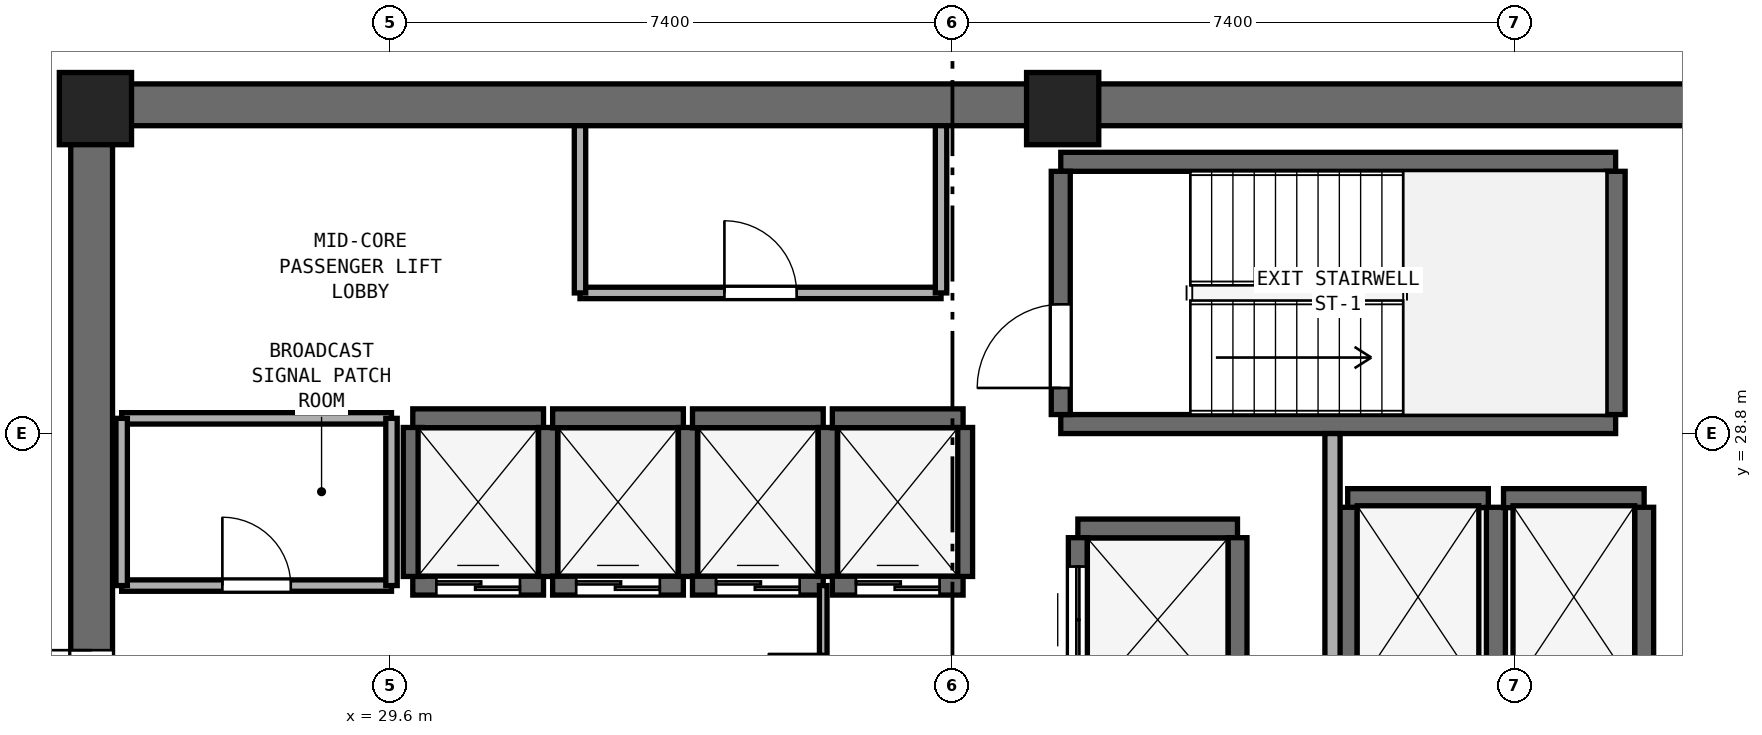
"""IFC4 building model, lengths in metres.
Left out: names, types, materials, properties, quantities, classifications, styles, units other than length and angle.
Written with IfcOpenShell. Run it as: python <this file> out.ifc"""

import sys

from ifc_helpers import new_model, si_unit, direction, frame, frame_2d, origin, origin_2d, place, context, subcontext, project, spatial, rectangle, extrude, element, fill, save


model = new_model("IFC4")
c1 = context("Model", 3, precision=1e-05, world=origin(), true_north=direction((0.0, 1.0)))
c2 = subcontext(c1, "Body", "Model", "MODEL_VIEW")
j1 = project(units=[si_unit("LENGTHUNIT", "METRE"), si_unit("PLANEANGLEUNIT", "RADIAN")], contexts=[c1])
p1 = place(None, origin())
s1 = spatial("IfcSite", under=j1, at=p1, CompositionType="ELEMENT")
p2 = place(p1, origin())
s2 = spatial("IfcBuilding", under=s1, at=p2, CompositionType="ELEMENT")
p3 = place(p2, frame((0.0, 0.0, 125.0)))
s3 = spatial("IfcBuildingStorey", under=s2, at=p3, CompositionType="ELEMENT", Elevation=125.0)
p4 = place(p3, frame((25.4, 33.125, 0.0), z_axis=(0.0, 0.0, 1.0), x_axis=(1.0, 0.0, 0.0)))
e1 = element("IfcWall", 1, at=p4, inside=s3, PredefinedType="SHEAR", context=c2, shape_type="SweptSolid", body=[
    extrude(rectangle(XDim=23.2, YDim=0.55, at=frame_2d((11.6, 0.0))), origin(), (0.0, 0.0, 1.0), 3.54),
])
p5 = place(p3, frame((25.675, 17.55, 0.0), z_axis=(0.0, 0.0, 1.0), x_axis=(0.0, 1.0, 0.0)))
e2 = element("IfcWall", 2, at=p5, inside=s3, PredefinedType="SHEAR", context=c2, shape_type="SweptSolid", body=[
    extrude(rectangle(XDim=15.3, YDim=0.55, at=frame_2d((7.65, 0.0))), origin(), (0.0, 0.0, 1.0), 3.54),
])
p6 = place(p5, frame((6.9, 0.0, 0.0)))
e3 = element("IfcOpeningElement", 3, at=p6, cuts=e2, PredefinedType="OPENING", context=c2, shape_type="SweptSolid", body=[
    extrude(rectangle(XDim=1.5, YDim=2.15, at=frame_2d((0.75, 1.075))), frame((0.0, 0.285, 0.0), z_axis=(0.0, -1.0, 0.0), x_axis=(1.0, 0.0, 0.0)), (0.0, 0.0, 1.0), 0.57),
])
for number, where, z_axis, x_axis in (
    (4, (38.45, 33.075, 0.0), (0.0, 0.0, 1.0), (1.0, 0.0, 0.0)),
    (5, (25.725, 33.075, 0.0), (0.0, 0.0, 1.0), (1.0, 0.0, 0.0)),
):
    element("IfcColumn", number, at=place(p3, frame(where, z_axis=z_axis, x_axis=x_axis)), inside=s3, PredefinedType="PILASTER", context=c2, shape_type="SweptSolid", body=[
        extrude(rectangle(XDim=0.95, YDim=0.95, at=origin_2d()), origin(), (0.0, 0.0, 1.0), 3.8),
    ])
for number, where, z_axis, x_axis in (
    (6, (38.425, 28.925, 0.0), (0.0, 0.0, 1.0), (1.0, 0.0, 0.0)),
    (7, (38.425, 32.375, 0.0), (0.0, 0.0, 1.0), (1.0, 0.0, 0.0)),
):
    element("IfcWall", number, at=place(p3, frame(where, z_axis=z_axis, x_axis=x_axis)), inside=s3, PredefinedType="SHEAR", context=c2, shape_type="SweptSolid", body=[
        extrude(rectangle(XDim=7.3, YDim=0.25, at=frame_2d((3.65, 0.0))), origin(), (0.0, 0.0, 1.0), 3.54),
    ])
p7 = place(p3, frame((38.425, 29.05, 0.0), z_axis=(0.0, 0.0, 1.0), x_axis=(0.0, 1.0, 0.0)))
e8 = element("IfcWall", 8, at=p7, inside=s3, PredefinedType="SHEAR", context=c2, shape_type="SweptSolid", body=[
    extrude(rectangle(XDim=3.2, YDim=0.25, at=frame_2d((1.6, 0.0))), origin(), (0.0, 0.0, 1.0), 3.54),
])
p8 = place(p7, frame((0.35, 0.0, 0.0)))
e9 = element("IfcOpeningElement", 9, at=p8, cuts=e8, PredefinedType="OPENING", context=c2, shape_type="SweptSolid", body=[
    extrude(rectangle(XDim=1.1, YDim=2.15, at=frame_2d((0.55, 1.075))), frame((0.0, 0.135, 0.0), z_axis=(0.0, -1.0, 0.0), x_axis=(1.0, 0.0, 0.0)), (0.0, 0.0, 1.0), 0.27),
])
p9 = place(p3, frame((45.725, 29.05, 0.0), z_axis=(0.0, 0.0, 1.0), x_axis=(0.0, 1.0, 0.0)))
e10 = element("IfcWall", 10, at=p9, inside=s3, PredefinedType="SHEAR", context=c2, shape_type="SweptSolid", body=[
    extrude(rectangle(XDim=3.2, YDim=0.25, at=frame_2d((1.6, 0.0))), origin(), (0.0, 0.0, 1.0), 3.54),
])
p10 = place(p3, frame((29.9, 26.8, 0.0), z_axis=(0.0, 0.0, 1.0), x_axis=(1.0, 0.0, 0.0)))
e11 = element("IfcWall", 11, at=p10, inside=s3, PredefinedType="SHEAR", context=c2, shape_type="SweptSolid", body=[
    extrude(rectangle(XDim=1.72, YDim=0.25, at=frame_2d((0.86, 0.0))), origin(), (0.0, 0.0, 1.0), 3.54),
])
p11 = place(p10, frame((0.31, 0.0, 0.0)))
e12 = element("IfcOpeningElement", 12, at=p11, cuts=e11, PredefinedType="OPENING", context=c2, shape_type="SweptSolid", body=[
    extrude(rectangle(XDim=1.1, YDim=2.15, at=frame_2d((0.55, 1.075))), frame((0.0, 0.135, 0.0), z_axis=(0.0, -1.0, 0.0), x_axis=(1.0, 0.0, 0.0)), (0.0, 0.0, 1.0), 0.27),
])
p12 = place(p3, frame((29.9, 29.0, 0.0), z_axis=(0.0, 0.0, 1.0), x_axis=(1.0, 0.0, 0.0)))
e13 = element("IfcWall", 13, at=p12, inside=s3, PredefinedType="SHEAR", context=c2, shape_type="SweptSolid", body=[
    extrude(rectangle(XDim=1.72, YDim=0.25, at=frame_2d((0.86, 0.0))), origin(), (0.0, 0.0, 1.0), 3.54),
])
for number, where, z_axis, x_axis in (
    (14, (29.9, 26.92, 0.0), (0.0, 0.0, 1.0), (0.0, 1.0, 0.0)),
    (15, (31.68, 26.92, 0.0), (0.0, 0.0, 1.0), (0.0, 1.0, 0.0)),
):
    element("IfcWall", number, at=place(p3, frame(where, z_axis=z_axis, x_axis=x_axis)), inside=s3, PredefinedType="SHEAR", context=c2, shape_type="SweptSolid", body=[
        extrude(rectangle(XDim=1.96, YDim=0.25, at=frame_2d((0.98, 0.0))), origin(), (0.0, 0.0, 1.0), 3.54),
    ])
p13 = place(p3, frame((31.74, 26.8, 0.0), z_axis=(0.0, 0.0, 1.0), x_axis=(1.0, 0.0, 0.0)))
e16 = element("IfcWall", 16, at=p13, inside=s3, PredefinedType="SHEAR", context=c2, shape_type="SweptSolid", body=[
    extrude(rectangle(XDim=1.72, YDim=0.25, at=frame_2d((0.86, 0.0))), origin(), (0.0, 0.0, 1.0), 3.54),
])
p14 = place(p13, frame((0.31, 0.0, 0.0)))
e17 = element("IfcOpeningElement", 17, at=p14, cuts=e16, PredefinedType="OPENING", context=c2, shape_type="SweptSolid", body=[
    extrude(rectangle(XDim=1.1, YDim=2.15, at=frame_2d((0.55, 1.075))), frame((0.0, 0.135, 0.0), z_axis=(0.0, -1.0, 0.0), x_axis=(1.0, 0.0, 0.0)), (0.0, 0.0, 1.0), 0.27),
])
p15 = place(p3, frame((31.74, 29.0, 0.0), z_axis=(0.0, 0.0, 1.0), x_axis=(1.0, 0.0, 0.0)))
e18 = element("IfcWall", 18, at=p15, inside=s3, PredefinedType="SHEAR", context=c2, shape_type="SweptSolid", body=[
    extrude(rectangle(XDim=1.72, YDim=0.25, at=frame_2d((0.86, 0.0))), origin(), (0.0, 0.0, 1.0), 3.54),
])
p16 = place(p3, frame((33.52, 26.92, 0.0), z_axis=(0.0, 0.0, 1.0), x_axis=(0.0, 1.0, 0.0)))
e19 = element("IfcWall", 19, at=p16, inside=s3, PredefinedType="SHEAR", context=c2, shape_type="SweptSolid", body=[
    extrude(rectangle(XDim=1.96, YDim=0.25, at=frame_2d((0.98, 0.0))), origin(), (0.0, 0.0, 1.0), 3.54),
])
p17 = place(p3, frame((33.58, 26.8, 0.0), z_axis=(0.0, 0.0, 1.0), x_axis=(1.0, 0.0, 0.0)))
e20 = element("IfcWall", 20, at=p17, inside=s3, PredefinedType="SHEAR", context=c2, shape_type="SweptSolid", body=[
    extrude(rectangle(XDim=1.72, YDim=0.25, at=frame_2d((0.86, 0.0))), origin(), (0.0, 0.0, 1.0), 3.54),
])
p18 = place(p17, frame((0.31, 0.0, 0.0)))
e21 = element("IfcOpeningElement", 21, at=p18, cuts=e20, PredefinedType="OPENING", context=c2, shape_type="SweptSolid", body=[
    extrude(rectangle(XDim=1.1, YDim=2.15, at=frame_2d((0.55, 1.075))), frame((0.0, 0.135, 0.0), z_axis=(0.0, -1.0, 0.0), x_axis=(1.0, 0.0, 0.0)), (0.0, 0.0, 1.0), 0.27),
])
p19 = place(p3, frame((33.58, 29.0, 0.0), z_axis=(0.0, 0.0, 1.0), x_axis=(1.0, 0.0, 0.0)))
e22 = element("IfcWall", 22, at=p19, inside=s3, PredefinedType="SHEAR", context=c2, shape_type="SweptSolid", body=[
    extrude(rectangle(XDim=1.72, YDim=0.25, at=frame_2d((0.86, 0.0))), origin(), (0.0, 0.0, 1.0), 3.54),
])
p20 = place(p3, frame((35.36, 26.92, 0.0), z_axis=(0.0, 0.0, 1.0), x_axis=(0.0, 1.0, 0.0)))
e23 = element("IfcWall", 23, at=p20, inside=s3, PredefinedType="SHEAR", context=c2, shape_type="SweptSolid", body=[
    extrude(rectangle(XDim=1.96, YDim=0.25, at=frame_2d((0.98, 0.0))), origin(), (0.0, 0.0, 1.0), 3.54),
])
p21 = place(p3, frame((35.42, 26.8, 0.0), z_axis=(0.0, 0.0, 1.0), x_axis=(1.0, 0.0, 0.0)))
e24 = element("IfcWall", 24, at=p21, inside=s3, PredefinedType="SHEAR", context=c2, shape_type="SweptSolid", body=[
    extrude(rectangle(XDim=1.72, YDim=0.25, at=frame_2d((0.86, 0.0))), origin(), (0.0, 0.0, 1.0), 3.54),
])
p22 = place(p21, frame((0.31, 0.0, 0.0)))
e25 = element("IfcOpeningElement", 25, at=p22, cuts=e24, PredefinedType="OPENING", context=c2, shape_type="SweptSolid", body=[
    extrude(rectangle(XDim=1.1, YDim=2.15, at=frame_2d((0.55, 1.075))), frame((0.0, 0.135, 0.0), z_axis=(0.0, -1.0, 0.0), x_axis=(1.0, 0.0, 0.0)), (0.0, 0.0, 1.0), 0.27),
])
p23 = place(p3, frame((35.42, 29.0, 0.0), z_axis=(0.0, 0.0, 1.0), x_axis=(1.0, 0.0, 0.0)))
e26 = element("IfcWall", 26, at=p23, inside=s3, PredefinedType="SHEAR", context=c2, shape_type="SweptSolid", body=[
    extrude(rectangle(XDim=1.72, YDim=0.25, at=frame_2d((0.86, 0.0))), origin(), (0.0, 0.0, 1.0), 3.54),
])
p24 = place(p3, frame((37.14, 26.92, 0.0), z_axis=(0.0, 0.0, 1.0), x_axis=(0.0, 1.0, 0.0)))
e27 = element("IfcWall", 27, at=p24, inside=s3, PredefinedType="SHEAR", context=c2, shape_type="SweptSolid", body=[
    extrude(rectangle(XDim=1.96, YDim=0.25, at=frame_2d((0.98, 0.0))), origin(), (0.0, 0.0, 1.0), 3.54),
])
p25 = place(p3, frame((42.2, 27.95, 0.0), z_axis=(0.0, 0.0, 1.0), x_axis=(1.0, 0.0, 0.0)))
e28 = element("IfcWall", 28, at=p25, inside=s3, PredefinedType="SHEAR", context=c2, shape_type="SweptSolid", body=[
    extrude(rectangle(XDim=1.85, YDim=0.25, at=frame_2d((0.925, 0.0))), origin(), (0.0, 0.0, 1.0), 3.54),
])
for number, where, z_axis, x_axis in (
    (29, (42.2, 25.47, 0.0), (0.0, 0.0, 1.0), (0.0, 1.0, 0.0)),
    (30, (44.15, 25.47, 0.0), (0.0, 0.0, 1.0), (0.0, 1.0, 0.0)),
):
    element("IfcWall", number, at=place(p3, frame(where, z_axis=z_axis, x_axis=x_axis)), inside=s3, PredefinedType="SHEAR", context=c2, shape_type="SweptSolid", body=[
        extrude(rectangle(XDim=2.36, YDim=0.25, at=frame_2d((1.18, 0.0))), origin(), (0.0, 0.0, 1.0), 3.54),
    ])
p26 = place(p3, frame((44.25, 27.95, 0.0), z_axis=(0.0, 0.0, 1.0), x_axis=(1.0, 0.0, 0.0)))
e31 = element("IfcWall", 31, at=p26, inside=s3, PredefinedType="SHEAR", context=c2, shape_type="SweptSolid", body=[
    extrude(rectangle(XDim=1.85, YDim=0.25, at=frame_2d((0.925, 0.0))), origin(), (0.0, 0.0, 1.0), 3.54),
])
p27 = place(p3, frame((46.1, 25.47, 0.0), z_axis=(0.0, 0.0, 1.0), x_axis=(0.0, 1.0, 0.0)))
e32 = element("IfcWall", 32, at=p27, inside=s3, PredefinedType="SHEAR", context=c2, shape_type="SweptSolid", body=[
    extrude(rectangle(XDim=2.36, YDim=0.25, at=frame_2d((1.18, 0.0))), origin(), (0.0, 0.0, 1.0), 3.54),
])
p28 = place(p3, frame((38.65, 27.55, 0.0), z_axis=(0.0, 0.0, 1.0), x_axis=(1.0, 0.0, 0.0)))
e33 = element("IfcWall", 33, at=p28, inside=s3, PredefinedType="SHEAR", context=c2, shape_type="SweptSolid", body=[
    extrude(rectangle(XDim=2.1, YDim=0.25, at=frame_2d((1.05, 0.0))), origin(), (0.0, 0.0, 1.0), 3.54),
])
p29 = place(p3, frame((38.65, 25.27, 0.0), z_axis=(0.0, 0.0, 1.0), x_axis=(0.0, 1.0, 0.0)))
e34 = element("IfcWall", 34, at=p29, inside=s3, PredefinedType="SHEAR", context=c2, shape_type="SweptSolid", body=[
    extrude(rectangle(XDim=2.16, YDim=0.25, at=frame_2d((1.08, 0.0))), origin(), (0.0, 0.0, 1.0), 3.54),
])
p30 = place(p29, frame((0.38, 0.0, 0.0)))
e35 = element("IfcOpeningElement", 35, at=p30, cuts=e34, PredefinedType="OPENING", context=c2, shape_type="SweptSolid", body=[
    extrude(rectangle(XDim=1.4, YDim=2.2, at=frame_2d((0.7, 1.1))), frame((0.0, 0.135, 0.0), z_axis=(0.0, -1.0, 0.0), x_axis=(1.0, 0.0, 0.0)), (0.0, 0.0, 1.0), 0.27),
])
p31 = place(p3, frame((40.75, 25.27, 0.0), z_axis=(0.0, 0.0, 1.0), x_axis=(0.0, 1.0, 0.0)))
e36 = element("IfcWall", 36, at=p31, inside=s3, PredefinedType="SHEAR", context=c2, shape_type="SweptSolid", body=[
    extrude(rectangle(XDim=2.16, YDim=0.25, at=frame_2d((1.08, 0.0))), origin(), (0.0, 0.0, 1.0), 3.54),
])
p32 = place(p3, frame((42.0, 22.75, 0.0), z_axis=(0.0, 0.0, 1.0), x_axis=(0.0, 1.0, 0.0)))
e37 = element("IfcWall", 37, at=p32, inside=s3, PredefinedType="SOLIDWALL", context=c2, shape_type="SweptSolid", body=[
    extrude(rectangle(XDim=6.05, YDim=0.2, at=frame_2d((3.025, 0.0))), origin(), (0.0, 0.0, 1.0), 3.54),
])
p33 = place(p32, frame((0.65, 0.0, 0.0)))
e38 = element("IfcOpeningElement", 38, at=p33, cuts=e37, PredefinedType="OPENING", context=c2, shape_type="SweptSolid", body=[
    extrude(rectangle(XDim=1.2, YDim=2.15, at=frame_2d((0.6, 1.075))), frame((0.0, 0.11, 0.0), z_axis=(0.0, -1.0, 0.0), x_axis=(1.0, 0.0, 0.0)), (0.0, 0.0, 1.0), 0.22),
])
p34 = place(p3, frame((32.1, 30.65, 0.0), z_axis=(0.0, 0.0, 1.0), x_axis=(1.0, 0.0, 0.0)))
e39 = element("IfcWall", 39, at=p34, inside=s3, PredefinedType="PARTITIONING", context=c2, shape_type="SweptSolid", body=[
    extrude(rectangle(XDim=4.75, YDim=0.15, at=frame_2d((2.375, 0.0))), origin(), (0.0, 0.0, 1.0), 3.54),
])
p35 = place(p34, frame((1.9, 0.0, 0.0)))
e40 = element("IfcOpeningElement", 40, at=p35, cuts=e39, PredefinedType="OPENING", context=c2, shape_type="SweptSolid", body=[
    extrude(rectangle(XDim=0.95, YDim=2.1, at=frame_2d((0.475, 1.05))), frame((0.0, 0.085, 0.0), z_axis=(0.0, -1.0, 0.0), x_axis=(1.0, 0.0, 0.0)), (0.0, 0.0, 1.0), 0.17),
])
for number, where, z_axis, x_axis in (
    (41, (32.1, 30.65, 0.0), (0.0, 0.0, 1.0), (0.0, 1.0, 0.0)),
    (42, (36.85, 30.65, 0.0), (0.0, 0.0, 1.0), (0.0, 1.0, 0.0)),
):
    element("IfcWall", number, at=place(p3, frame(where, z_axis=z_axis, x_axis=x_axis)), inside=s3, PredefinedType="PARTITIONING", context=c2, shape_type="SweptSolid", body=[
        extrude(rectangle(XDim=2.2, YDim=0.15, at=frame_2d((1.1, 0.0))), origin(), (0.0, 0.0, 1.0), 3.54),
    ])
p36 = place(p3, frame((26.07, 26.8, 0.0), z_axis=(0.0, 0.0, 1.0), x_axis=(1.0, 0.0, 0.0)))
e43 = element("IfcWall", 43, at=p36, inside=s3, PredefinedType="PARTITIONING", context=c2, shape_type="SweptSolid", body=[
    extrude(rectangle(XDim=3.55, YDim=0.15, at=frame_2d((1.775, 0.0))), origin(), (0.0, 0.0, 1.0), 3.54),
])
p37 = place(p36, frame((1.325, 0.0, 0.0)))
e44 = element("IfcOpeningElement", 44, at=p37, cuts=e43, PredefinedType="OPENING", context=c2, shape_type="SweptSolid", body=[
    extrude(rectangle(XDim=0.9, YDim=2.1, at=frame_2d((0.45, 1.05))), frame((0.0, 0.085, 0.0), z_axis=(0.0, -1.0, 0.0), x_axis=(1.0, 0.0, 0.0)), (0.0, 0.0, 1.0), 0.17),
])
p38 = place(p3, frame((26.07, 29.0, 0.0), z_axis=(0.0, 0.0, 1.0), x_axis=(1.0, 0.0, 0.0)))
e45 = element("IfcWall", 45, at=p38, inside=s3, PredefinedType="PARTITIONING", context=c2, shape_type="SweptSolid", body=[
    extrude(rectangle(XDim=3.55, YDim=0.15, at=frame_2d((1.775, 0.0))), origin(), (0.0, 0.0, 1.0), 3.54),
])
p39 = place(p3, frame((26.07, 26.8, 0.0), z_axis=(0.0, 0.0, 1.0), x_axis=(0.0, 1.0, 0.0)))
e46 = element("IfcWall", 46, at=p39, inside=s3, PredefinedType="PARTITIONING", context=c2, shape_type="SweptSolid", body=[
    extrude(rectangle(XDim=2.2, YDim=0.15, at=frame_2d((1.1, 0.0))), origin(), (0.0, 0.0, 1.0), 2.64),
])
p40 = place(p3, frame((29.62, 26.8, 0.0), z_axis=(0.0, 0.0, 1.0), x_axis=(0.0, 1.0, 0.0)))
e47 = element("IfcWall", 47, at=p40, inside=s3, PredefinedType="PARTITIONING", context=c2, shape_type="SweptSolid", body=[
    extrude(rectangle(XDim=2.2, YDim=0.15, at=frame_2d((1.1, 0.0))), origin(), (0.0, 0.0, 1.0), 3.54),
])
p41 = place(p3, frame((35.3, 23.6, 0.0), z_axis=(0.0, 0.0, 1.0), x_axis=(0.0, 1.0, 0.0)))
e48 = element("IfcWall", 48, at=p41, inside=s3, PredefinedType="PARTITIONING", context=c2, shape_type="SweptSolid", body=[
    extrude(rectangle(XDim=3.2, YDim=0.1, at=frame_2d((1.6, 0.0))), origin(), (0.0, 0.0, 1.0), 3.54),
])
p42 = place(p41, frame((0.85, 0.0, 0.0)))
e49 = element("IfcOpeningElement", 49, at=p42, cuts=e48, PredefinedType="OPENING", context=c2, shape_type="SweptSolid", body=[
    extrude(rectangle(XDim=1.45, YDim=2.12, at=frame_2d((0.725, 1.06))), frame((0.0, 0.06, 0.0), z_axis=(0.0, -1.0, 0.0), x_axis=(1.0, 0.0, 0.0)), (0.0, 0.0, 1.0), 0.12),
])
p43 = place(p8, origin())
e50 = element("IfcDoor", 50, at=p43, inside=s3, OperationType="SINGLE_SWING_LEFT", PredefinedType="DOOR", context=c2, shape_type="SweptSolid", body=[
    extrude(rectangle(XDim=1.1, YDim=2.15, at=frame_2d((0.55, 1.075))), frame((0.0, 0.025, 0.0), z_axis=(0.0, -1.0, 0.0), x_axis=(1.0, 0.0, 0.0)), (0.0, 0.0, 1.0), 0.05),
])
fill(e9, e50)
p44 = place(p11, origin())
e51 = element("IfcDoor", 51, at=p44, inside=s3, OperationType="DOUBLE_DOOR_SLIDING", PredefinedType="DOOR", context=c2, shape_type="SweptSolid", body=[
    extrude(rectangle(XDim=1.1, YDim=2.15, at=frame_2d((0.55, 1.075))), frame((0.0, 0.025, 0.0), z_axis=(0.0, -1.0, 0.0), x_axis=(1.0, 0.0, 0.0)), (0.0, 0.0, 1.0), 0.05),
])
fill(e12, e51)
p45 = place(p14, origin())
e52 = element("IfcDoor", 52, at=p45, inside=s3, OperationType="DOUBLE_DOOR_SLIDING", PredefinedType="DOOR", context=c2, shape_type="SweptSolid", body=[
    extrude(rectangle(XDim=1.1, YDim=2.15, at=frame_2d((0.55, 1.075))), frame((0.0, 0.025, 0.0), z_axis=(0.0, -1.0, 0.0), x_axis=(1.0, 0.0, 0.0)), (0.0, 0.0, 1.0), 0.05),
])
fill(e17, e52)
p46 = place(p18, origin())
e53 = element("IfcDoor", 53, at=p46, inside=s3, OperationType="DOUBLE_DOOR_SLIDING", PredefinedType="DOOR", context=c2, shape_type="SweptSolid", body=[
    extrude(rectangle(XDim=1.1, YDim=2.15, at=frame_2d((0.55, 1.075))), frame((0.0, 0.025, 0.0), z_axis=(0.0, -1.0, 0.0), x_axis=(1.0, 0.0, 0.0)), (0.0, 0.0, 1.0), 0.05),
])
fill(e21, e53)
p47 = place(p22, origin())
e54 = element("IfcDoor", 54, at=p47, inside=s3, OperationType="DOUBLE_DOOR_SLIDING", PredefinedType="DOOR", context=c2, shape_type="SweptSolid", body=[
    extrude(rectangle(XDim=1.1, YDim=2.15, at=frame_2d((0.55, 1.075))), frame((0.0, 0.025, 0.0), z_axis=(0.0, -1.0, 0.0), x_axis=(1.0, 0.0, 0.0)), (0.0, 0.0, 1.0), 0.05),
])
fill(e25, e54)
p48 = place(p30, origin())
e55 = element("IfcDoor", 55, at=p48, inside=s3, OperationType="DOUBLE_DOOR_SLIDING", PredefinedType="DOOR", context=c2, shape_type="SweptSolid", body=[
    extrude(rectangle(XDim=1.4, YDim=2.2, at=frame_2d((0.7, 1.1))), frame((0.0, 0.025, 0.0), z_axis=(0.0, -1.0, 0.0), x_axis=(1.0, 0.0, 0.0)), (0.0, 0.0, 1.0), 0.05),
])
fill(e35, e55)
p49 = place(p6, origin())
e56 = element("IfcDoor", 56, at=p49, inside=s3, OperationType="DOUBLE_DOOR_SINGLE_SWING", PredefinedType="DOOR", context=c2, shape_type="SweptSolid", body=[
    extrude(rectangle(XDim=1.5, YDim=2.15, at=frame_2d((0.75, 1.075))), frame((0.0, 0.025, 0.0), z_axis=(0.0, -1.0, 0.0), x_axis=(1.0, 0.0, 0.0)), (0.0, 0.0, 1.0), 0.05),
])
fill(e3, e56)
p50 = place(p35, origin())
e57 = element("IfcDoor", 57, at=p50, inside=s3, OperationType="SINGLE_SWING_LEFT", PredefinedType="DOOR", context=c2, shape_type="SweptSolid", body=[
    extrude(rectangle(XDim=0.95, YDim=2.1, at=frame_2d((0.475, 1.05))), frame((0.0, 0.025, 0.0), z_axis=(0.0, -1.0, 0.0), x_axis=(1.0, 0.0, 0.0)), (0.0, 0.0, 1.0), 0.05),
])
fill(e40, e57)
p51 = place(p37, origin())
e58 = element("IfcDoor", 58, at=p51, inside=s3, OperationType="SINGLE_SWING_LEFT", PredefinedType="DOOR", context=c2, shape_type="SweptSolid", body=[
    extrude(rectangle(XDim=0.9, YDim=2.1, at=frame_2d((0.45, 1.05))), frame((0.0, 0.025, 0.0), z_axis=(0.0, -1.0, 0.0), x_axis=(1.0, 0.0, 0.0)), (0.0, 0.0, 1.0), 0.05),
])
fill(e44, e58)
p52 = place(p42, origin())
e59 = element("IfcDoor", 59, at=p52, inside=s3, OperationType="DOUBLE_DOOR_SINGLE_SWING", PredefinedType="DOOR", context=c2, shape_type="SweptSolid", body=[
    extrude(rectangle(XDim=1.45, YDim=2.12, at=frame_2d((0.725, 1.06))), frame((0.0, 0.025, 0.0), z_axis=(0.0, -1.0, 0.0), x_axis=(1.0, 0.0, 0.0)), (0.0, 0.0, 1.0), 0.05),
])
fill(e49, e59)
save(model, sys.argv[1])
